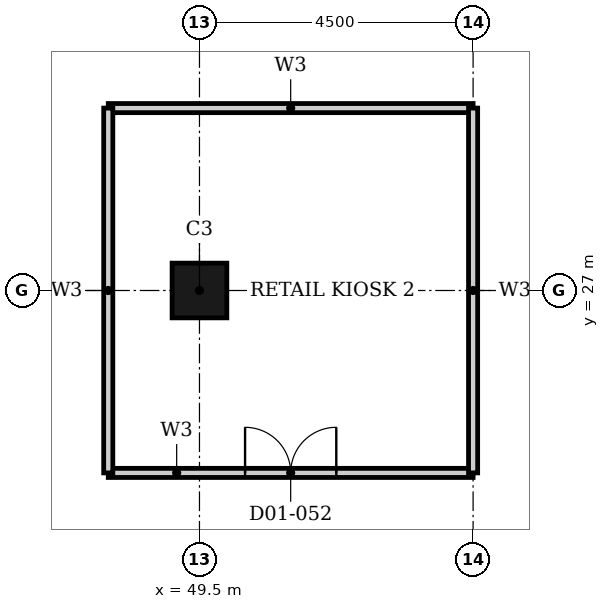
"""IFC4 building model, lengths in metres.
Left out: names, types, materials, properties, quantities, classifications, styles, units other than length and angle.
Written with IfcOpenShell. Run it as: python <this file> out.ifc"""

import sys

from ifc_helpers import new_model, si_unit, direction, frame, frame_2d, origin, origin_2d, place, context, subcontext, project, spatial, rectangle, hollow_rectangle, extrude, element, fill, save


model = new_model("IFC4")
c1 = context("Model", 3, precision=1e-05, world=origin(), true_north=direction((0.0, 1.0)))
c2 = subcontext(c1, "Body", "Model", "MODEL_VIEW")
j1 = project(units=[si_unit("LENGTHUNIT", "METRE"), si_unit("PLANEANGLEUNIT", "RADIAN")], contexts=[c1])
p1 = place(None, origin())
s1 = spatial("IfcSite", under=j1, at=p1, CompositionType="ELEMENT")
p2 = place(p1, origin())
s2 = spatial("IfcBuilding", under=s1, at=p2, CompositionType="ELEMENT")
p3 = place(p2, frame((0.0, 0.0, 6.6)))
s3 = spatial("IfcBuildingStorey", under=s2, at=p3, CompositionType="ELEMENT", Elevation=6.6)
p4 = place(p3, frame((49.5, 27.0, 0.0), z_axis=(0.0, 0.0, 1.0), x_axis=(1.0, 0.0, 0.0)))
e1 = element("IfcColumn", 1, at=p4, inside=s3, PredefinedType="COLUMN", context=c2, shape_type="SweptSolid", body=[
    extrude(hollow_rectangle(XDim=0.9, YDim=0.9, WallThickness=0.028, at=origin_2d()), origin(), (0.0, 0.0, 1.0), 5.4),
])
p5 = place(p3, frame((48.0, 24.0, 0.0), z_axis=(0.0, 0.0, 1.0), x_axis=(1.0, 0.0, 0.0)))
e2 = element("IfcWall", 2, at=p5, inside=s3, PredefinedType="PARTITIONING", context=c2, shape_type="SweptSolid", body=[
    extrude(rectangle(XDim=6.0, YDim=0.15, at=frame_2d((3.0, 0.0))), origin(), (0.0, 0.0, 1.0), 5.05),
])
p6 = place(p5, frame((2.25, 0.0, 0.0)))
e3 = element("IfcOpeningElement", 3, at=p6, cuts=e2, PredefinedType="OPENING", context=c2, shape_type="SweptSolid", body=[
    extrude(rectangle(XDim=1.5, YDim=2.4, at=frame_2d((0.75, 1.2))), frame((0.0, 0.085, 0.0), z_axis=(0.0, -1.0, 0.0), x_axis=(1.0, 0.0, 0.0)), (0.0, 0.0, 1.0), 0.17),
])
for number, where, z_axis, x_axis in (
    (4, (48.0, 30.0, 0.0), (0.0, 0.0, 1.0), (1.0, 0.0, 0.0)),
    (5, (48.0, 24.0, 0.0), (0.0, 0.0, 1.0), (0.0, 1.0, 0.0)),
    (6, (54.0, 24.0, 0.0), (0.0, 0.0, 1.0), (0.0, 1.0, 0.0)),
):
    element("IfcWall", number, at=place(p3, frame(where, z_axis=z_axis, x_axis=x_axis)), inside=s3, PredefinedType="PARTITIONING", context=c2, shape_type="SweptSolid", body=[
        extrude(rectangle(XDim=6.0, YDim=0.15, at=frame_2d((3.0, 0.0))), origin(), (0.0, 0.0, 1.0), 5.05),
    ])
p7 = place(p6, origin())
e7 = element("IfcDoor", 7, at=p7, inside=s3, OperationType="DOUBLE_DOOR_SINGLE_SWING", PredefinedType="DOOR", context=c2, shape_type="SweptSolid", body=[
    extrude(rectangle(XDim=1.5, YDim=2.4, at=frame_2d((0.75, 1.2))), frame((0.0, 0.025, 0.0), z_axis=(0.0, -1.0, 0.0), x_axis=(1.0, 0.0, 0.0)), (0.0, 0.0, 1.0), 0.05),
])
fill(e3, e7)
save(model, sys.argv[1])
